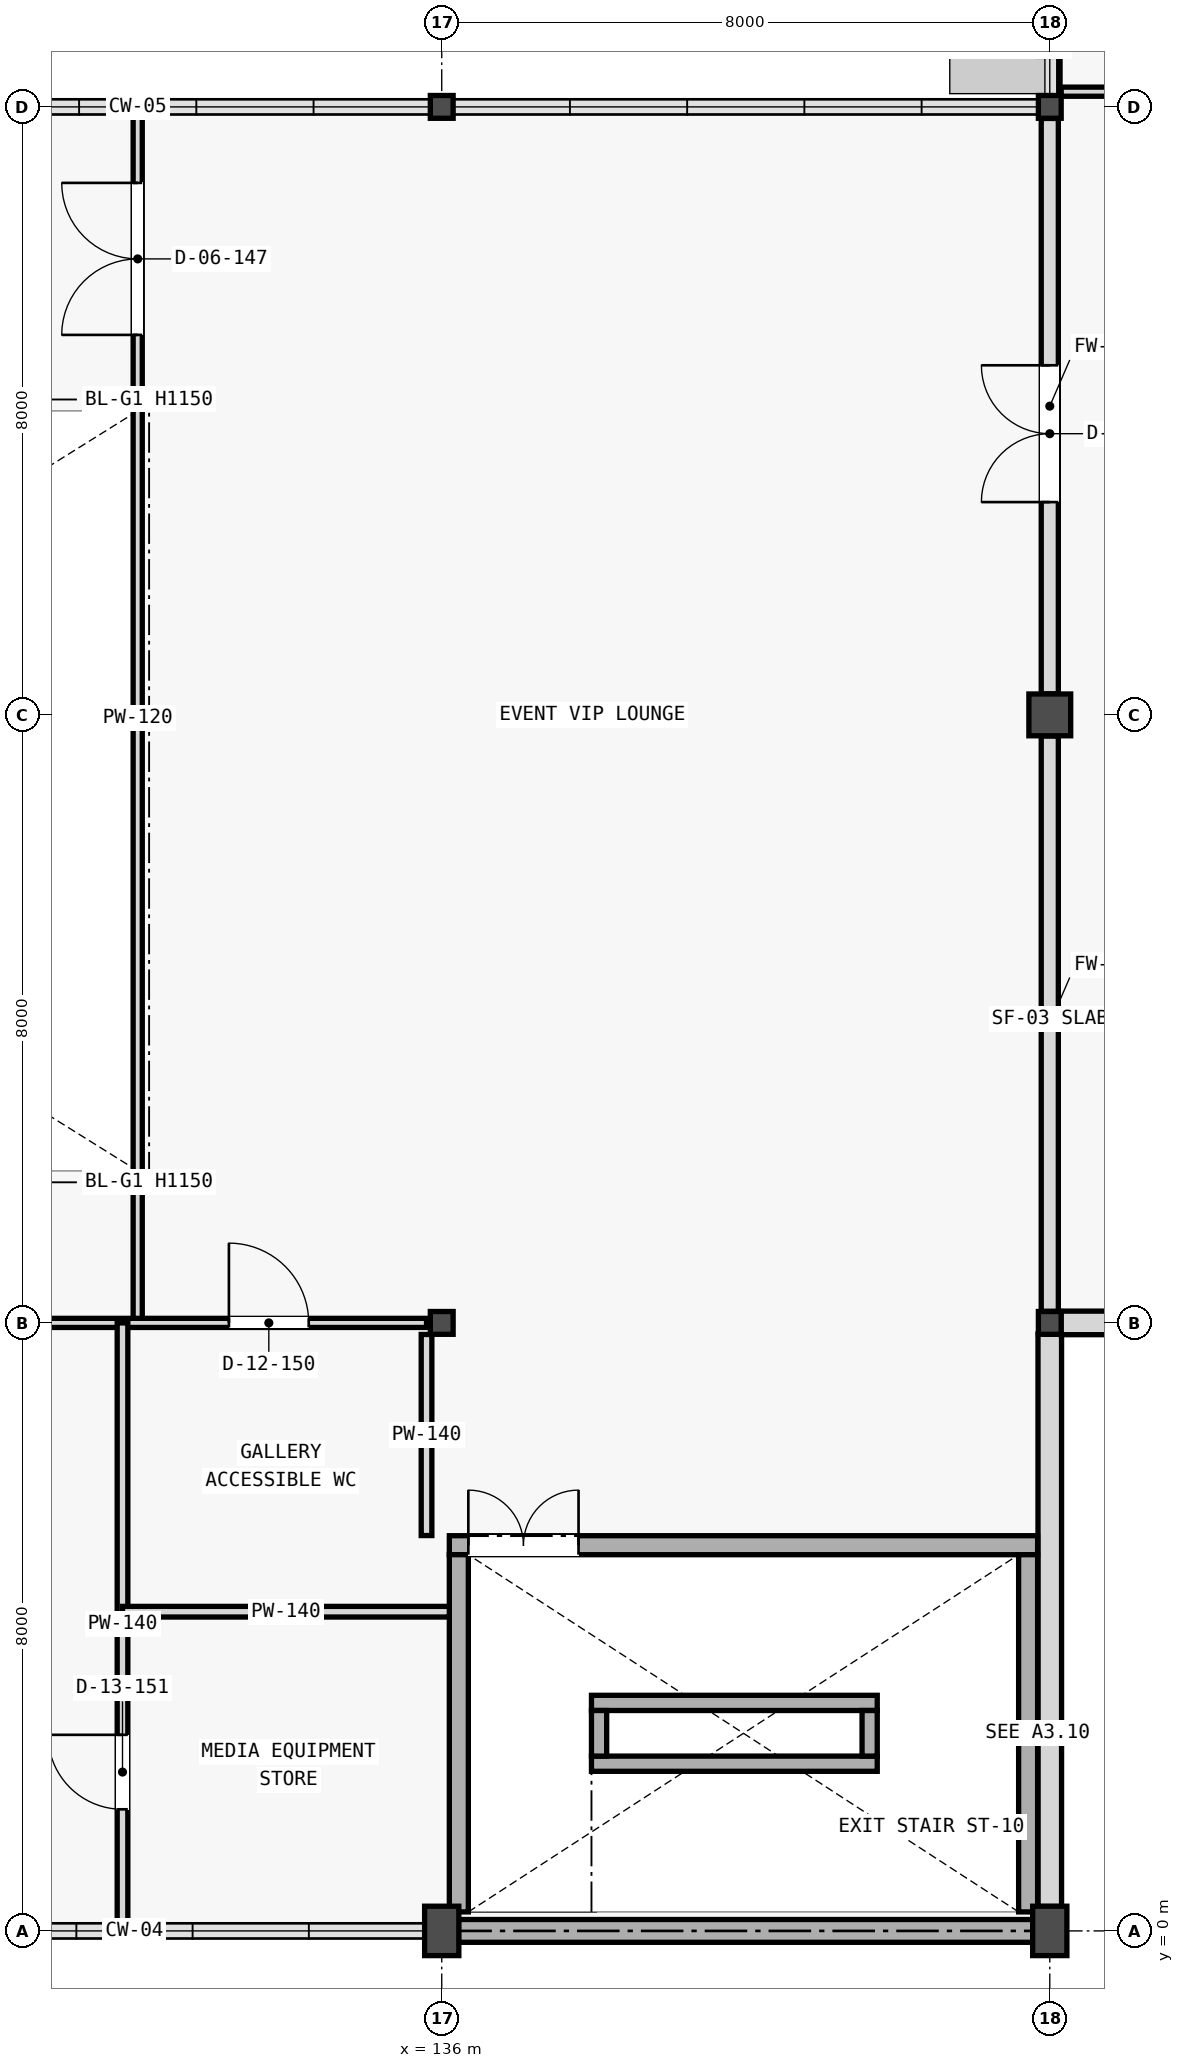
"""IFC4 building model, lengths in metres.
Left out: names, types, materials, properties, quantities, classifications, styles, units other than length and angle.
Written with IfcOpenShell. Run it as: python <this file> out.ifc"""

import sys

from ifc_helpers import new_model, si_unit, direction, frame, frame_2d, origin, origin_2d, place, context, subcontext, project, spatial, rectangle, i_section, extrude, element, fill, save


model = new_model("IFC4")
c1 = context("Model", 3, precision=1e-05, world=origin(), true_north=direction((0.0, 1.0)))
c2 = subcontext(c1, "Body", "Model", "MODEL_VIEW")
j1 = project(units=[si_unit("LENGTHUNIT", "METRE"), si_unit("PLANEANGLEUNIT", "RADIAN")], contexts=[c1])
p1 = place(None, origin())
s1 = spatial("IfcSite", under=j1, at=p1, CompositionType="ELEMENT")
p2 = place(p1, origin())
s2 = spatial("IfcBuilding", under=s1, at=p2, CompositionType="ELEMENT")
p3 = place(p2, frame((0.0, 0.0, 5.4)))
s3 = spatial("IfcBuildingStorey", under=s2, at=p3, CompositionType="ELEMENT", Elevation=5.4)
p4 = place(p3, frame((136.0, 0.0, 0.0), z_axis=(0.0, 0.0, 1.0), x_axis=(1.0, 0.0, 0.0)))
e1 = element("IfcColumn", 1, at=p4, inside=s3, PredefinedType="COLUMN", context=c2, shape_type="SweptSolid", body=[
    extrude(rectangle(XDim=0.45, YDim=0.65, at=origin_2d()), origin(), (0.0, 0.0, 1.0), 5.943),
])
for number, where, z_axis, x_axis in (
    (2, (136.0, 8.0, 0.0), (0.0, 0.0, 1.0), (1.0, 0.0, 0.0)),
    (3, (136.0, 24.0, 0.0), (0.0, 0.0, 1.0), (1.0, 0.0, 0.0)),
):
    element("IfcColumn", number, at=place(p3, frame(where, z_axis=z_axis, x_axis=x_axis)), inside=s3, PredefinedType="COLUMN", context=c2, shape_type="SweptSolid", body=[
        extrude(i_section(OverallWidth=0.3, OverallDepth=0.3, WebThickness=0.011, FlangeThickness=0.019, at=origin_2d()), origin(), (0.0, 0.0, 1.0), 5.943),
    ])
p5 = place(p3, frame((144.0, 0.0, 0.0), z_axis=(0.0, 0.0, 1.0), x_axis=(1.0, 0.0, 0.0)))
e4 = element("IfcColumn", 4, at=p5, inside=s3, PredefinedType="COLUMN", context=c2, shape_type="SweptSolid", body=[
    extrude(rectangle(XDim=0.45, YDim=0.65, at=origin_2d()), origin(), (0.0, 0.0, 1.0), 4.61),
])
for number, where, z_axis, x_axis in (
    (5, (144.0, 8.0, 0.0), (0.0, 0.0, 1.0), (1.0, 0.0, 0.0)),
    (6, (144.0, 24.0, 0.0), (0.0, 0.0, 1.0), (1.0, 0.0, 0.0)),
):
    element("IfcColumn", number, at=place(p3, frame(where, z_axis=z_axis, x_axis=x_axis)), inside=s3, PredefinedType="COLUMN", context=c2, shape_type="SweptSolid", body=[
        extrude(i_section(OverallWidth=0.3, OverallDepth=0.3, WebThickness=0.011, FlangeThickness=0.019, at=origin_2d()), origin(), (0.0, 0.0, 1.0), 4.61),
    ])
p6 = place(p3, frame((144.0, 16.0, 0.0), z_axis=(0.0, 0.0, 1.0), x_axis=(1.0, 0.0, 0.0)))
e7 = element("IfcColumn", 7, at=p6, inside=s3, PredefinedType="COLUMN", context=c2, shape_type="SweptSolid", body=[
    extrude(rectangle(XDim=0.55, YDim=0.55, at=origin_2d()), origin(), (0.0, 0.0, 1.0), 4.61),
])
p7 = place(p3, frame((136.221, 0.0, 0.0), z_axis=(0.0, 0.0, 1.0), x_axis=(1.0, 0.0, 0.0)))
e8 = element("IfcWall", 8, at=p7, inside=s3, PredefinedType="SHEAR", context=c2, shape_type="SweptSolid", body=[
    extrude(rectangle(XDim=7.558, YDim=0.3, at=frame_2d((3.779, 0.0))), origin(), (0.0, 0.0, 1.0), 4.8),
])
p8 = place(p3, frame((144.0, 0.321, 0.0), z_axis=(0.0, 0.0, 1.0), x_axis=(0.0, 1.0, 0.0)))
e9 = element("IfcWall", 9, at=p8, inside=s3, PredefinedType="STANDARD", context=c2, shape_type="SweptSolid", body=[
    extrude(rectangle(XDim=7.533, YDim=0.31, at=frame_2d((3.767, 0.0))), origin(), (0.0, 0.0, 1.0), 3.57),
])
p9 = place(p3, frame((144.0, 24.146, 0.0), z_axis=(0.0, 0.0, 1.0), x_axis=(0.0, 1.0, 0.0)))
e10 = element("IfcWall", 10, at=p9, inside=s3, PredefinedType="STANDARD", context=c2, shape_type="SweptSolid", body=[
    extrude(rectangle(XDim=7.583, YDim=0.27, at=frame_2d((3.792, 0.0))), origin(), (0.0, 0.0, 1.0), 0.8),
])
p10 = place(p3, frame((144.146, 8.0, 0.0), z_axis=(0.0, 0.0, 1.0), x_axis=(1.0, 0.0, 0.0)))
e11 = element("IfcWall", 11, at=p10, inside=s3, PredefinedType="STANDARD", context=c2, shape_type="SweptSolid", body=[
    extrude(rectangle(XDim=7.583, YDim=0.31, at=frame_2d((3.792, 0.0))), origin(), (0.0, 0.0, 1.0), 3.57),
])
p11 = place(p10, frame((2.904, 0.0, 0.95)))
e12 = element("IfcOpeningElement", 12, at=p11, cuts=e11, PredefinedType="OPENING", context=c2, shape_type="SweptSolid", body=[
    extrude(rectangle(XDim=1.9, YDim=1.45, at=frame_2d((0.95, 0.725))), frame((0.0, 0.165, 0.0), z_axis=(0.0, -1.0, 0.0), x_axis=(1.0, 0.0, 0.0)), (0.0, 0.0, 1.0), 0.33),
])
p12 = place(p3, frame((136.1, 5.075, 0.0), z_axis=(0.0, 0.0, 1.0), x_axis=(1.0, 0.0, 0.0)))
e13 = element("IfcWall", 13, at=p12, inside=s3, PredefinedType="SHEAR", context=c2, shape_type="SweptSolid", body=[
    extrude(rectangle(XDim=7.74, YDim=0.25, at=frame_2d((3.87, 0.0))), origin(), (0.0, 0.0, 1.0), 4.55),
])
p13 = place(p12, frame((0.25, 0.0, 0.0)))
e14 = element("IfcOpeningElement", 14, at=p13, cuts=e13, PredefinedType="OPENING", context=c2, shape_type="SweptSolid", body=[
    extrude(rectangle(XDim=1.45, YDim=2.2, at=frame_2d((0.725, 1.1))), frame((0.0, 0.135, 0.0), z_axis=(0.0, -1.0, 0.0), x_axis=(1.0, 0.0, 0.0)), (0.0, 0.0, 1.0), 0.27),
])
for number, where, z_axis, x_axis in (
    (15, (136.225, 0.25, 0.0), (0.0, 0.0, 1.0), (0.0, 1.0, 0.0)),
    (16, (143.715, 0.25, 0.0), (0.0, 0.0, 1.0), (0.0, 1.0, 0.0)),
):
    element("IfcWall", number, at=place(p3, frame(where, z_axis=z_axis, x_axis=x_axis)), inside=s3, PredefinedType="SHEAR", context=c2, shape_type="SweptSolid", body=[
        extrude(rectangle(XDim=4.7, YDim=0.25, at=frame_2d((2.35, 0.0))), origin(), (0.0, 0.0, 1.0), 4.55),
    ])
for number, where, z_axis, x_axis in (
    (17, (137.97, 2.2, 0.0), (0.0, 0.0, 1.0), (1.0, 0.0, 0.0)),
    (18, (137.97, 3.0, 0.0), (0.0, 0.0, 1.0), (1.0, 0.0, 0.0)),
):
    element("IfcWall", number, at=place(p3, frame(where, z_axis=z_axis, x_axis=x_axis)), inside=s3, PredefinedType="SHEAR", context=c2, shape_type="SweptSolid", body=[
        extrude(rectangle(XDim=3.76, YDim=0.2, at=frame_2d((1.88, 0.0))), origin(), (0.0, 0.0, 1.0), 4.55),
    ])
for number, where, z_axis, x_axis in (
    (19, (138.07, 2.3, 0.0), (0.0, 0.0, 1.0), (0.0, 1.0, 0.0)),
    (20, (141.63, 2.3, 0.0), (0.0, 0.0, 1.0), (0.0, 1.0, 0.0)),
):
    element("IfcWall", number, at=place(p3, frame(where, z_axis=z_axis, x_axis=x_axis)), inside=s3, PredefinedType="SHEAR", context=c2, shape_type="SweptSolid", body=[
        extrude(rectangle(XDim=0.6, YDim=0.2, at=frame_2d((0.3, 0.0))), origin(), (0.0, 0.0, 1.0), 4.55),
    ])
p14 = place(p3, frame((144.0, 8.152, 0.0), z_axis=(0.0, 0.0, 1.0), x_axis=(0.0, 1.0, 0.0)))
e21 = element("IfcWall", 21, at=p14, inside=s3, PredefinedType="STANDARD", context=c2, shape_type="SweptSolid", body=[
    extrude(rectangle(XDim=7.571, YDim=0.225, at=frame_2d((3.785, 0.0))), origin(), (0.0, 0.0, 1.0), 3.57),
])
p15 = place(p3, frame((144.0, 16.277, 0.0), z_axis=(0.0, 0.0, 1.0), x_axis=(0.0, 1.0, 0.0)))
e22 = element("IfcWall", 22, at=p15, inside=s3, PredefinedType="STANDARD", context=c2, shape_type="SweptSolid", body=[
    extrude(rectangle(XDim=7.571, YDim=0.225, at=frame_2d((3.785, 0.0))), origin(), (0.0, 0.0, 1.0), 3.57),
])
p16 = place(p15, frame((2.523, 0.0, 0.0)))
e23 = element("IfcOpeningElement", 23, at=p16, cuts=e22, PredefinedType="OPENING", context=c2, shape_type="SweptSolid", body=[
    extrude(rectangle(XDim=1.8, YDim=2.3, at=frame_2d((0.9, 1.15))), frame((0.0, 0.123, 0.0), z_axis=(0.0, -1.0, 0.0), x_axis=(1.0, 0.0, 0.0)), (0.0, 0.0, 1.0), 0.245),
])
p17 = place(p3, frame((132.0, 8.0, 0.0), z_axis=(0.0, 0.0, 1.0), x_axis=(0.0, 1.0, 0.0)))
e24 = element("IfcWall", 24, at=p17, inside=s3, PredefinedType="PARTITIONING", context=c2, shape_type="SweptSolid", body=[
    extrude(rectangle(XDim=15.92, YDim=0.12, at=frame_2d((7.96, 0.0))), origin(), (0.0, 0.0, 1.0), 4.535),
])
p18 = place(p17, frame((13.0, 0.0, 0.0)))
e25 = element("IfcOpeningElement", 25, at=p18, cuts=e24, PredefinedType="OPENING", context=c2, shape_type="SweptSolid", body=[
    extrude(rectangle(XDim=2.0, YDim=2.4, at=frame_2d((1.0, 1.2))), frame((0.0, 0.07, 0.0), z_axis=(0.0, -1.0, 0.0), x_axis=(1.0, 0.0, 0.0)), (0.0, 0.0, 1.0), 0.14),
])
p19 = place(p3, frame((128.152, 8.0, 0.0), z_axis=(0.0, 0.0, 1.0), x_axis=(1.0, 0.0, 0.0)))
e26 = element("IfcWall", 26, at=p19, inside=s3, PredefinedType="PARTITIONING", context=c2, shape_type="SweptSolid", body=[
    extrude(rectangle(XDim=7.648, YDim=0.12, at=frame_2d((3.824, 0.0))), origin(), (0.0, 0.0, 1.0), 4.535),
])
p20 = place(p19, frame((0.848, 0.0, 0.0)))
e27 = element("IfcOpeningElement", 27, at=p20, cuts=e26, PredefinedType="OPENING", context=c2, shape_type="SweptSolid", body=[
    extrude(rectangle(XDim=1.0, YDim=2.15, at=frame_2d((0.5, 1.075))), frame((0.0, 0.07, 0.0), z_axis=(0.0, -1.0, 0.0), x_axis=(1.0, 0.0, 0.0)), (0.0, 0.0, 1.0), 0.14),
])
p21 = place(p19, frame((5.048, 0.0, 0.0)))
e28 = element("IfcOpeningElement", 28, at=p21, cuts=e26, PredefinedType="OPENING", context=c2, shape_type="SweptSolid", body=[
    extrude(rectangle(XDim=1.05, YDim=2.15, at=frame_2d((0.525, 1.075))), frame((0.0, 0.07, 0.0), z_axis=(0.0, -1.0, 0.0), x_axis=(1.0, 0.0, 0.0)), (0.0, 0.0, 1.0), 0.14),
])
p22 = place(p3, frame((131.8, 0.08, 0.0), z_axis=(0.0, 0.0, 1.0), x_axis=(0.0, 1.0, 0.0)))
e29 = element("IfcWall", 29, at=p22, inside=s3, PredefinedType="PLUMBINGWALL", context=c2, shape_type="SweptSolid", body=[
    extrude(rectangle(XDim=7.92, YDim=0.14, at=frame_2d((3.96, 0.0))), origin(), (0.0, 0.0, 1.0), 4.535),
])
p23 = place(p22, frame((1.52, 0.0, 0.0)))
e30 = element("IfcOpeningElement", 30, at=p23, cuts=e29, PredefinedType="OPENING", context=c2, shape_type="SweptSolid", body=[
    extrude(rectangle(XDim=0.98, YDim=2.1, at=frame_2d((0.49, 1.05))), frame((0.0, 0.08, 0.0), z_axis=(0.0, -1.0, 0.0), x_axis=(1.0, 0.0, 0.0)), (0.0, 0.0, 1.0), 0.16),
])
p24 = place(p3, frame((131.8, 4.2, 0.0), z_axis=(0.0, 0.0, 1.0), x_axis=(1.0, 0.0, 0.0)))
e31 = element("IfcWall", 31, at=p24, inside=s3, PredefinedType="PLUMBINGWALL", context=c2, shape_type="SweptSolid", body=[
    extrude(rectangle(XDim=4.3, YDim=0.14, at=frame_2d((2.15, 0.0))), origin(), (0.0, 0.0, 1.0), 4.535),
])
p25 = place(p3, frame((135.8, 5.202, 0.0), z_axis=(0.0, 0.0, 1.0), x_axis=(0.0, 1.0, 0.0)))
e32 = element("IfcWall", 32, at=p25, inside=s3, PredefinedType="PLUMBINGWALL", context=c2, shape_type="SweptSolid", body=[
    extrude(rectangle(XDim=2.646, YDim=0.14, at=frame_2d((1.323, 0.0))), origin(), (0.0, 0.0, 1.0), 4.535),
])
p26 = place(p3, frame((144.15, 24.2, 0.0), z_axis=(0.0, 0.0, 1.0), x_axis=(1.0, 0.0, 0.0)))
e33 = element("IfcWall", 33, at=p26, inside=s3, PredefinedType="PARTITIONING", context=c2, shape_type="SweptSolid", body=[
    extrude(rectangle(XDim=7.498, YDim=0.12, at=frame_2d((3.749, 0.0))), origin(), (0.0, 0.0, 1.0), 3.78),
])
p27 = place(p13, origin())
e34 = element("IfcDoor", 34, at=p27, inside=s3, OperationType="DOUBLE_DOOR_SINGLE_SWING", PredefinedType="DOOR", context=c2, shape_type="SweptSolid", body=[
    extrude(rectangle(XDim=1.45, YDim=2.2, at=frame_2d((0.725, 1.1))), frame((0.0, 0.025, 0.0), z_axis=(0.0, -1.0, 0.0), x_axis=(1.0, 0.0, 0.0)), (0.0, 0.0, 1.0), 0.05),
])
fill(e14, e34)
p28 = place(p16, origin())
e35 = element("IfcDoor", 35, at=p28, inside=s3, OperationType="DOUBLE_DOOR_SINGLE_SWING", PredefinedType="DOOR", context=c2, shape_type="SweptSolid", body=[
    extrude(rectangle(XDim=1.8, YDim=2.3, at=frame_2d((0.9, 1.15))), frame((0.0, 0.025, 0.0), z_axis=(0.0, -1.0, 0.0), x_axis=(1.0, 0.0, 0.0)), (0.0, 0.0, 1.0), 0.05),
])
fill(e23, e35)
p29 = place(p18, origin())
e36 = element("IfcDoor", 36, at=p29, inside=s3, OperationType="DOUBLE_DOOR_SINGLE_SWING", PredefinedType="DOOR", context=c2, shape_type="SweptSolid", body=[
    extrude(rectangle(XDim=2.0, YDim=2.4, at=frame_2d((1.0, 1.2))), frame((0.0, 0.025, 0.0), z_axis=(0.0, -1.0, 0.0), x_axis=(1.0, 0.0, 0.0)), (0.0, 0.0, 1.0), 0.05),
])
fill(e25, e36)
p30 = place(p21, origin())
e37 = element("IfcDoor", 37, at=p30, inside=s3, OperationType="SINGLE_SWING_LEFT", PredefinedType="DOOR", context=c2, shape_type="SweptSolid", body=[
    extrude(rectangle(XDim=1.05, YDim=2.15, at=frame_2d((0.525, 1.075))), frame((0.0, 0.025, 0.0), z_axis=(0.0, -1.0, 0.0), x_axis=(1.0, 0.0, 0.0)), (0.0, 0.0, 1.0), 0.05),
])
fill(e28, e37)
p31 = place(p23, origin())
e38 = element("IfcDoor", 38, at=p31, inside=s3, OperationType="SINGLE_SWING_RIGHT", PredefinedType="DOOR", context=c2, shape_type="SweptSolid", body=[
    extrude(rectangle(XDim=0.98, YDim=2.1, at=frame_2d((0.49, 1.05))), frame((0.0, 0.025, 0.0), z_axis=(0.0, -1.0, 0.0), x_axis=(1.0, 0.0, 0.0)), (0.0, 0.0, 1.0), 0.05),
])
fill(e30, e38)
save(model, sys.argv[1])
